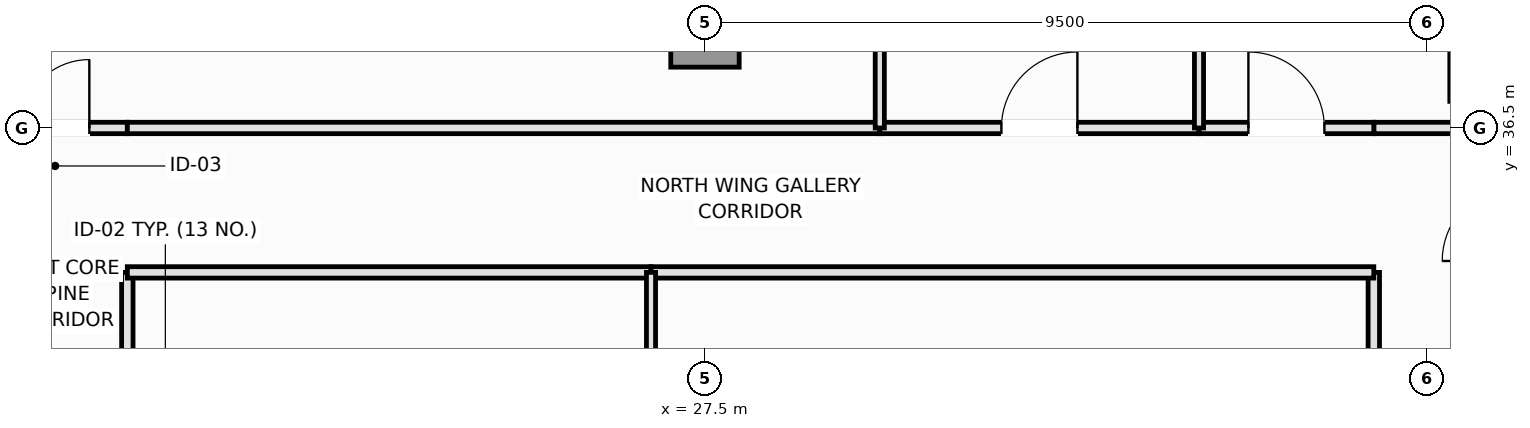
"""IFC4 building model, lengths in metres.
Left out: names, types, materials, properties, quantities, classifications, styles, units other than length and angle.
Written with IfcOpenShell. Run it as: python <this file> out.ifc"""

import sys

from ifc_helpers import new_model, si_unit, direction, frame, frame_2d, origin, origin_2d, place, context, subcontext, project, spatial, rectangle, extrude, element, fill, save


model = new_model("IFC4")
c1 = context("Model", 3, precision=1e-05, world=origin(), true_north=direction((0.0, 1.0)))
c2 = subcontext(c1, "Body", "Model", "MODEL_VIEW")
j1 = project(units=[si_unit("LENGTHUNIT", "METRE"), si_unit("PLANEANGLEUNIT", "RADIAN")], contexts=[c1])
p1 = place(None, origin())
s1 = spatial("IfcSite", under=j1, at=p1, CompositionType="ELEMENT")
p2 = place(p1, origin())
s2 = spatial("IfcBuilding", under=s1, at=p2, CompositionType="ELEMENT")
p3 = place(p2, frame((0.0, 0.0, 281.2)))
s3 = spatial("IfcBuildingStorey", under=s2, at=p3, CompositionType="ELEMENT", Elevation=281.2)
p4 = place(p3, frame((27.5, 37.75, 0.0), z_axis=(0.0, 0.0, 1.0), x_axis=(1.0, 0.0, 0.0)))
e1 = element("IfcColumn", 1, at=p4, inside=s3, PredefinedType="COLUMN", context=c2, shape_type="SweptSolid", body=[
    extrude(rectangle(XDim=0.9, YDim=0.9, at=origin_2d()), origin(), (0.0, 0.0, 1.0), 3.55),
])
p5 = place(p3, frame((19.9, 29.7, 0.0), z_axis=(0.0, 0.0, 1.0), x_axis=(0.0, 1.0, 0.0)))
e2 = element("IfcWall", 2, at=p5, inside=s3, PredefinedType="PARTITIONING", context=c2, shape_type="SweptSolid", body=[
    extrude(rectangle(XDim=4.9, YDim=0.15, at=frame_2d((2.45, 0.0))), origin(), (0.0, 0.0, 1.0), 3.39),
])
p6 = place(p5, frame((1.95, 0.0, 0.0)))
e3 = element("IfcOpeningElement", 3, at=p6, cuts=e2, PredefinedType="OPENING", context=c2, shape_type="SweptSolid", body=[
    extrude(rectangle(XDim=1.0, YDim=2.15, at=frame_2d((0.5, 1.075))), frame((0.0, 0.085, 0.0), z_axis=(0.0, -1.0, 0.0), x_axis=(1.0, 0.0, 0.0)), (0.0, 0.0, 1.0), 0.17),
])
p7 = place(p3, frame((18.0, 36.5, 0.0), z_axis=(0.0, 0.0, 1.0), x_axis=(1.0, 0.0, 0.0)))
e4 = element("IfcWall", 4, at=p7, inside=s3, PredefinedType="PARTITIONING", context=c2, shape_type="SweptSolid", body=[
    extrude(rectangle(XDim=1.9, YDim=0.15, at=frame_2d((0.95, 0.0))), origin(), (0.0, 0.0, 1.0), 3.39),
])
p8 = place(p7, frame((0.5, 0.0, 0.0)))
e5 = element("IfcOpeningElement", 5, at=p8, cuts=e4, PredefinedType="OPENING", context=c2, shape_type="SweptSolid", body=[
    extrude(rectangle(XDim=0.9, YDim=2.1, at=frame_2d((0.45, 1.05))), frame((0.0, 0.085, 0.0), z_axis=(0.0, -1.0, 0.0), x_axis=(1.0, 0.0, 0.0)), (0.0, 0.0, 1.0), 0.17),
])
p9 = place(p3, frame((36.3, 29.7, 0.0), z_axis=(0.0, 0.0, 1.0), x_axis=(0.0, 1.0, 0.0)))
e6 = element("IfcWall", 6, at=p9, inside=s3, PredefinedType="PARTITIONING", context=c2, shape_type="SweptSolid", body=[
    extrude(rectangle(XDim=4.9, YDim=0.15, at=frame_2d((2.45, 0.0))), origin(), (0.0, 0.0, 1.0), 3.39),
])
p10 = place(p9, frame((1.95, 0.0, 0.0)))
e7 = element("IfcOpeningElement", 7, at=p10, cuts=e6, PredefinedType="OPENING", context=c2, shape_type="SweptSolid", body=[
    extrude(rectangle(XDim=1.0, YDim=2.15, at=frame_2d((0.5, 1.075))), frame((0.0, 0.085, 0.0), z_axis=(0.0, -1.0, 0.0), x_axis=(1.0, 0.0, 0.0)), (0.0, 0.0, 1.0), 0.17),
])
p11 = place(p3, frame((36.3, 36.5, 0.0), z_axis=(0.0, 0.0, 1.0), x_axis=(1.0, 0.0, 0.0)))
e8 = element("IfcWall", 8, at=p11, inside=s3, PredefinedType="PARTITIONING", context=c2, shape_type="SweptSolid", body=[
    extrude(rectangle(XDim=1.9, YDim=0.15, at=frame_2d((0.95, 0.0))), origin(), (0.0, 0.0, 1.0), 3.39),
])
p12 = place(p3, frame((19.9, 34.6, 0.0), z_axis=(0.0, 0.0, 1.0), x_axis=(1.0, 0.0, 0.0)))
e9 = element("IfcWall", 9, at=p12, inside=s3, PredefinedType="PARTITIONING", context=c2, shape_type="SweptSolid", body=[
    extrude(rectangle(XDim=6.89, YDim=0.15, at=frame_2d((3.445, 0.0))), origin(), (0.0, 0.0, 1.0), 3.39),
])
p13 = place(p3, frame((26.79, 34.6, 0.0), z_axis=(0.0, 0.0, 1.0), x_axis=(1.0, 0.0, 0.0)))
e10 = element("IfcWall", 10, at=p13, inside=s3, PredefinedType="PARTITIONING", context=c2, shape_type="SweptSolid", body=[
    extrude(rectangle(XDim=9.51, YDim=0.15, at=frame_2d((4.755, 0.0))), origin(), (0.0, 0.0, 1.0), 3.39),
])
p14 = place(p3, frame((19.9, 36.5, 0.0), z_axis=(0.0, 0.0, 1.0), x_axis=(1.0, 0.0, 0.0)))
e11 = element("IfcWall", 11, at=p14, inside=s3, PredefinedType="PARTITIONING", context=c2, shape_type="SweptSolid", body=[
    extrude(rectangle(XDim=9.9, YDim=0.15, at=frame_2d((4.95, 0.0))), origin(), (0.0, 0.0, 1.0), 3.39),
])
p15 = place(p3, frame((29.8, 36.5, 0.0), z_axis=(0.0, 0.0, 1.0), x_axis=(1.0, 0.0, 0.0)))
e12 = element("IfcWall", 12, at=p15, inside=s3, PredefinedType="PARTITIONING", context=c2, shape_type="SweptSolid", body=[
    extrude(rectangle(XDim=4.2, YDim=0.15, at=frame_2d((2.1, 0.0))), origin(), (0.0, 0.0, 1.0), 3.39),
])
p16 = place(p15, frame((1.6, 0.0, 0.0)))
e13 = element("IfcOpeningElement", 13, at=p16, cuts=e12, PredefinedType="OPENING", context=c2, shape_type="SweptSolid", body=[
    extrude(rectangle(XDim=1.0, YDim=2.15, at=frame_2d((0.5, 1.075))), frame((0.0, 0.085, 0.0), z_axis=(0.0, -1.0, 0.0), x_axis=(1.0, 0.0, 0.0)), (0.0, 0.0, 1.0), 0.17),
])
p17 = place(p3, frame((34.0, 36.5, 0.0), z_axis=(0.0, 0.0, 1.0), x_axis=(1.0, 0.0, 0.0)))
e14 = element("IfcWall", 14, at=p17, inside=s3, PredefinedType="PARTITIONING", context=c2, shape_type="SweptSolid", body=[
    extrude(rectangle(XDim=2.3, YDim=0.15, at=frame_2d((1.15, 0.0))), origin(), (0.0, 0.0, 1.0), 3.39),
])
p18 = place(p17, frame((0.65, 0.0, 0.0)))
e15 = element("IfcOpeningElement", 15, at=p18, cuts=e14, PredefinedType="OPENING", context=c2, shape_type="SweptSolid", body=[
    extrude(rectangle(XDim=1.0, YDim=2.15, at=frame_2d((0.5, 1.075))), frame((0.0, 0.085, 0.0), z_axis=(0.0, -1.0, 0.0), x_axis=(1.0, 0.0, 0.0)), (0.0, 0.0, 1.0), 0.17),
])
p19 = place(p3, frame((26.79, 29.7, 0.0), z_axis=(0.0, 0.0, 1.0), x_axis=(0.0, 1.0, 0.0)))
e16 = element("IfcWall", 16, at=p19, inside=s3, PredefinedType="PARTITIONING", context=c2, shape_type="SweptSolid", body=[
    extrude(rectangle(XDim=4.9, YDim=0.12, at=frame_2d((2.45, 0.0))), origin(), (0.0, 0.0, 1.0), 3.39),
])
for number, where, z_axis, x_axis in (
    (17, (29.8, 36.5, 0.0), (0.0, 0.0, 1.0), (0.0, 1.0, 0.0)),
    (18, (34.0, 36.5, 0.0), (0.0, 0.0, 1.0), (0.0, 1.0, 0.0)),
):
    element("IfcWall", number, at=place(p3, frame(where, z_axis=z_axis, x_axis=x_axis)), inside=s3, PredefinedType="PARTITIONING", context=c2, shape_type="SweptSolid", body=[
        extrude(rectangle(XDim=7.49, YDim=0.12, at=frame_2d((3.745, 0.0))), origin(), (0.0, 0.0, 1.0), 3.39),
    ])
p20 = place(p8, origin())
e19 = element("IfcDoor", 19, at=p20, inside=s3, OperationType="SINGLE_SWING_RIGHT", PredefinedType="DOOR", context=c2, shape_type="SweptSolid", body=[
    extrude(rectangle(XDim=0.9, YDim=2.1, at=frame_2d((0.45, 1.05))), frame((0.0, 0.025, 0.0), z_axis=(0.0, -1.0, 0.0), x_axis=(1.0, 0.0, 0.0)), (0.0, 0.0, 1.0), 0.05),
])
fill(e5, e19)
p21 = place(p16, origin())
e20 = element("IfcDoor", 20, at=p21, inside=s3, OperationType="SINGLE_SWING_RIGHT", PredefinedType="DOOR", context=c2, shape_type="SweptSolid", body=[
    extrude(rectangle(XDim=1.0, YDim=2.15, at=frame_2d((0.5, 1.075))), frame((0.0, 0.025, 0.0), z_axis=(0.0, -1.0, 0.0), x_axis=(1.0, 0.0, 0.0)), (0.0, 0.0, 1.0), 0.05),
])
fill(e13, e20)
p22 = place(p18, origin())
e21 = element("IfcDoor", 21, at=p22, inside=s3, OperationType="SINGLE_SWING_LEFT", PredefinedType="DOOR", context=c2, shape_type="SweptSolid", body=[
    extrude(rectangle(XDim=1.0, YDim=2.15, at=frame_2d((0.5, 1.075))), frame((0.0, 0.025, 0.0), z_axis=(0.0, -1.0, 0.0), x_axis=(1.0, 0.0, 0.0)), (0.0, 0.0, 1.0), 0.05),
])
fill(e15, e21)
save(model, sys.argv[1])
